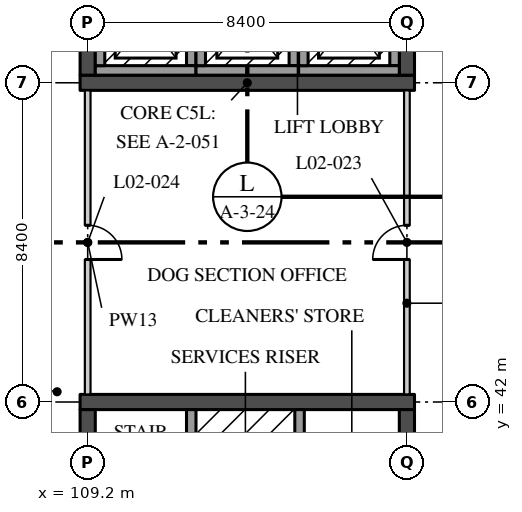
"""IFC4 building model, lengths in metres.
Left out: names, types, materials, properties, quantities, classifications, styles, units other than length and angle.
Written with IfcOpenShell. Run it as: python <this file> out.ifc"""

import sys

from ifc_helpers import new_model, si_unit, direction, frame, frame_2d, origin, place, context, subcontext, project, spatial, rectangle, extrude, element, fill, save


model = new_model("IFC4")
c1 = context("Model", 3, precision=1e-05, world=origin(), true_north=direction((0.0, 1.0)))
c2 = subcontext(c1, "Body", "Model", "MODEL_VIEW")
j1 = project(units=[si_unit("LENGTHUNIT", "METRE"), si_unit("PLANEANGLEUNIT", "RADIAN")], contexts=[c1])
p1 = place(None, origin())
s1 = spatial("IfcSite", under=j1, at=p1, CompositionType="ELEMENT")
p2 = place(p1, origin())
s2 = spatial("IfcBuilding", under=s1, at=p2, CompositionType="ELEMENT")
p3 = place(p2, frame((0.0, 0.0, 9.9)))
s3 = spatial("IfcBuildingStorey", under=s2, at=p3, CompositionType="ELEMENT", Elevation=9.9)
p4 = place(p3, frame((109.0, 50.4, 0.0), z_axis=(0.0, 0.0, 1.0), x_axis=(1.0, 0.0, 0.0)))
e1 = element("IfcWall", 1, at=p4, inside=s3, PredefinedType="SHEAR", context=c2, shape_type="SweptSolid", body=[
    extrude(rectangle(XDim=8.8, YDim=0.4, at=frame_2d((4.4, 0.0))), origin(), (0.0, 0.0, 1.0), 4.37),
])
p5 = place(p3, frame((109.2, 50.6, 0.0), z_axis=(0.0, 0.0, 1.0), x_axis=(0.0, 1.0, 0.0)))
e2 = element("IfcWall", 2, at=p5, inside=s3, PredefinedType="SHEAR", context=c2, shape_type="SweptSolid", body=[
    extrude(rectangle(XDim=8.0, YDim=0.4, at=frame_2d((4.0, 0.0))), origin(), (0.0, 0.0, 1.0), 4.37),
])
p6 = place(p5, frame((3.25, 0.0, 0.0)))
e3 = element("IfcOpeningElement", 3, at=p6, cuts=e2, PredefinedType="OPENING", context=c2, shape_type="SweptSolid", body=[
    extrude(rectangle(XDim=1.2, YDim=2.1, at=frame_2d((0.6, 1.05))), frame((0.0, 0.21, 0.0), z_axis=(0.0, -1.0, 0.0), x_axis=(1.0, 0.0, 0.0)), (0.0, 0.0, 1.0), 0.42),
])
p7 = place(p3, frame((117.6, 50.6, 0.0), z_axis=(0.0, 0.0, 1.0), x_axis=(0.0, 1.0, 0.0)))
e4 = element("IfcWall", 4, at=p7, inside=s3, PredefinedType="SHEAR", context=c2, shape_type="SweptSolid", body=[
    extrude(rectangle(XDim=8.0, YDim=0.4, at=frame_2d((4.0, 0.0))), origin(), (0.0, 0.0, 1.0), 4.37),
])
p8 = place(p7, frame((3.25, 0.0, 0.0)))
e5 = element("IfcOpeningElement", 5, at=p8, cuts=e4, PredefinedType="OPENING", context=c2, shape_type="SweptSolid", body=[
    extrude(rectangle(XDim=1.2, YDim=2.1, at=frame_2d((0.6, 1.05))), frame((0.0, 0.21, 0.0), z_axis=(0.0, -1.0, 0.0), x_axis=(1.0, 0.0, 0.0)), (0.0, 0.0, 1.0), 0.42),
])
p9 = place(p7, frame((6.0, 0.0, 0.0)))
e6 = element("IfcOpeningElement", 6, at=p9, cuts=e4, PredefinedType="OPENING", context=c2, shape_type="SweptSolid", body=[
    extrude(rectangle(XDim=1.2, YDim=2.1, at=frame_2d((0.6, 1.05))), frame((0.0, 0.21, 0.0), z_axis=(0.0, -1.0, 0.0), x_axis=(1.0, 0.0, 0.0)), (0.0, 0.0, 1.0), 0.42),
])
p10 = place(p3, frame((109.0, 42.0, 0.0), z_axis=(0.0, 0.0, 1.0), x_axis=(1.0, 0.0, 0.0)))
e7 = element("IfcWall", 7, at=p10, inside=s3, PredefinedType="SHEAR", context=c2, shape_type="SweptSolid", body=[
    extrude(rectangle(XDim=8.8, YDim=0.4, at=frame_2d((4.4, 0.0))), origin(), (0.0, 0.0, 1.0), 4.37),
])
p11 = place(p3, frame((109.2, 33.8, 0.0), z_axis=(0.0, 0.0, 1.0), x_axis=(0.0, 1.0, 0.0)))
e8 = element("IfcWall", 8, at=p11, inside=s3, PredefinedType="SHEAR", context=c2, shape_type="SweptSolid", body=[
    extrude(rectangle(XDim=8.0, YDim=0.4, at=frame_2d((4.0, 0.0))), origin(), (0.0, 0.0, 1.0), 4.37),
])
p12 = place(p11, frame((3.875, 0.0, 0.0)))
e9 = element("IfcOpeningElement", 9, at=p12, cuts=e8, PredefinedType="OPENING", context=c2, shape_type="SweptSolid", body=[
    extrude(rectangle(XDim=1.2, YDim=2.1, at=frame_2d((0.6, 1.05))), frame((0.0, 0.21, 0.0), z_axis=(0.0, -1.0, 0.0), x_axis=(1.0, 0.0, 0.0)), (0.0, 0.0, 1.0), 0.42),
])
p13 = place(p3, frame((117.6, 33.8, 0.0), z_axis=(0.0, 0.0, 1.0), x_axis=(0.0, 1.0, 0.0)))
e10 = element("IfcWall", 10, at=p13, inside=s3, PredefinedType="SHEAR", context=c2, shape_type="SweptSolid", body=[
    extrude(rectangle(XDim=8.0, YDim=0.4, at=frame_2d((4.0, 0.0))), origin(), (0.0, 0.0, 1.0), 4.37),
])
p14 = place(p13, frame((3.875, 0.0, 0.0)))
e11 = element("IfcOpeningElement", 11, at=p14, cuts=e10, PredefinedType="OPENING", context=c2, shape_type="SweptSolid", body=[
    extrude(rectangle(XDim=1.2, YDim=2.1, at=frame_2d((0.6, 1.05))), frame((0.0, 0.21, 0.0), z_axis=(0.0, -1.0, 0.0), x_axis=(1.0, 0.0, 0.0)), (0.0, 0.0, 1.0), 0.42),
])
p15 = place(p3, frame((111.925, 39.0, 0.0), z_axis=(0.0, 0.0, 1.0), x_axis=(0.0, 1.0, 0.0)))
e12 = element("IfcWall", 12, at=p15, inside=s3, PredefinedType="SOLIDWALL", context=c2, shape_type="SweptSolid", body=[
    extrude(rectangle(XDim=2.8, YDim=0.25, at=frame_2d((1.4, 0.0))), origin(), (0.0, 0.0, 1.0), 4.37),
])
p16 = place(p3, frame((114.775, 39.25, 0.0), z_axis=(0.0, 0.0, 1.0), x_axis=(0.0, 1.0, 0.0)))
e13 = element("IfcWall", 13, at=p16, inside=s3, PredefinedType="SOLIDWALL", context=c2, shape_type="SweptSolid", body=[
    extrude(rectangle(XDim=2.55, YDim=0.25, at=frame_2d((1.275, 0.0))), origin(), (0.0, 0.0, 1.0), 4.37),
])
p17 = place(p3, frame((111.925, 50.85, 0.0), z_axis=(0.0, 0.0, 1.0), x_axis=(0.0, 1.0, 0.0)))
e14 = element("IfcWall", 14, at=p17, inside=s3, PredefinedType="SOLIDWALL", context=c2, shape_type="SweptSolid", body=[
    extrude(rectangle(XDim=2.3, YDim=0.25, at=frame_2d((1.15, 0.0))), origin(), (0.0, 0.0, 1.0), 4.37),
])
p18 = place(p3, frame((109.4, 50.725, 0.0), z_axis=(0.0, 0.0, 1.0), x_axis=(1.0, 0.0, 0.0)))
e15 = element("IfcWall", 15, at=p18, inside=s3, PredefinedType="SOLIDWALL", context=c2, shape_type="SweptSolid", body=[
    extrude(rectangle(XDim=2.65, YDim=0.25, at=frame_2d((1.325, 0.0))), origin(), (0.0, 0.0, 1.0), 4.37),
])
for number, where, z_axis, x_axis in (
    (16, (109.525, 50.85, 0.0), (0.0, 0.0, 1.0), (0.0, 1.0, 0.0)),
    (17, (114.625, 50.85, 0.0), (0.0, 0.0, 1.0), (0.0, 1.0, 0.0)),
):
    element("IfcWall", number, at=place(p3, frame(where, z_axis=z_axis, x_axis=x_axis)), inside=s3, PredefinedType="SOLIDWALL", context=c2, shape_type="SweptSolid", body=[
        extrude(rectangle(XDim=2.3, YDim=0.25, at=frame_2d((1.15, 0.0))), origin(), (0.0, 0.0, 1.0), 4.37),
    ])
p19 = place(p3, frame((112.05, 50.725, 0.0), z_axis=(0.0, 0.0, 1.0), x_axis=(1.0, 0.0, 0.0)))
e18 = element("IfcWall", 18, at=p19, inside=s3, PredefinedType="SOLIDWALL", context=c2, shape_type="SweptSolid", body=[
    extrude(rectangle(XDim=2.7, YDim=0.25, at=frame_2d((1.35, 0.0))), origin(), (0.0, 0.0, 1.0), 4.37),
])
for number, where, z_axis, x_axis in (
    (19, (112.175, 50.85, 0.0), (0.0, 0.0, 1.0), (0.0, 1.0, 0.0)),
    (20, (117.275, 50.85, 0.0), (0.0, 0.0, 1.0), (0.0, 1.0, 0.0)),
):
    element("IfcWall", number, at=place(p3, frame(where, z_axis=z_axis, x_axis=x_axis)), inside=s3, PredefinedType="SOLIDWALL", context=c2, shape_type="SweptSolid", body=[
        extrude(rectangle(XDim=2.3, YDim=0.25, at=frame_2d((1.15, 0.0))), origin(), (0.0, 0.0, 1.0), 4.37),
    ])
p20 = place(p3, frame((114.75, 50.725, 0.0), z_axis=(0.0, 0.0, 1.0), x_axis=(1.0, 0.0, 0.0)))
e21 = element("IfcWall", 21, at=p20, inside=s3, PredefinedType="SOLIDWALL", context=c2, shape_type="SweptSolid", body=[
    extrude(rectangle(XDim=2.65, YDim=0.25, at=frame_2d((1.325, 0.0))), origin(), (0.0, 0.0, 1.0), 4.37),
])
p21 = place(p3, frame((114.875, 50.85, 0.0), z_axis=(0.0, 0.0, 1.0), x_axis=(0.0, 1.0, 0.0)))
e22 = element("IfcWall", 22, at=p21, inside=s3, PredefinedType="SOLIDWALL", context=c2, shape_type="SweptSolid", body=[
    extrude(rectangle(XDim=2.3, YDim=0.25, at=frame_2d((1.15, 0.0))), origin(), (0.0, 0.0, 1.0), 4.37),
])
p22 = place(p3, frame((117.6, 42.2, 0.0), z_axis=(0.0, 0.0, 1.0), x_axis=(0.0, 1.0, 0.0)))
e23 = element("IfcWall", 23, at=p22, inside=s3, PredefinedType="PARTITIONING", context=c2, shape_type="SweptSolid", body=[
    extrude(rectangle(XDim=8.0, YDim=0.15, at=frame_2d((4.0, 0.0))), origin(), (0.0, 0.0, 1.0), 3.746),
])
p23 = place(p22, frame((3.55, 0.0, 0.0)))
e24 = element("IfcOpeningElement", 24, at=p23, cuts=e23, PredefinedType="OPENING", context=c2, shape_type="SweptSolid", body=[
    extrude(rectangle(XDim=0.9, YDim=2.1, at=frame_2d((0.45, 1.05))), frame((0.0, 0.085, 0.0), z_axis=(0.0, -1.0, 0.0), x_axis=(1.0, 0.0, 0.0)), (0.0, 0.0, 1.0), 0.17),
])
p24 = place(p3, frame((109.2, 42.2, 0.0), z_axis=(0.0, 0.0, 1.0), x_axis=(0.0, 1.0, 0.0)))
e25 = element("IfcWall", 25, at=p24, inside=s3, PredefinedType="PARTITIONING", context=c2, shape_type="SweptSolid", body=[
    extrude(rectangle(XDim=8.0, YDim=0.15, at=frame_2d((4.0, 0.0))), origin(), (0.0, 0.0, 1.0), 3.746),
])
p25 = place(p24, frame((3.55, 0.0, 0.0)))
e26 = element("IfcOpeningElement", 26, at=p25, cuts=e25, PredefinedType="OPENING", context=c2, shape_type="SweptSolid", body=[
    extrude(rectangle(XDim=0.9, YDim=2.1, at=frame_2d((0.45, 1.05))), frame((0.0, 0.085, 0.0), z_axis=(0.0, -1.0, 0.0), x_axis=(1.0, 0.0, 0.0)), (0.0, 0.0, 1.0), 0.17),
])
p26 = place(p23, origin())
e27 = element("IfcDoor", 27, at=p26, inside=s3, OperationType="SINGLE_SWING_RIGHT", PredefinedType="DOOR", context=c2, shape_type="SweptSolid", body=[
    extrude(rectangle(XDim=0.9, YDim=2.1, at=frame_2d((0.45, 1.05))), frame((0.0, 0.025, 0.0), z_axis=(0.0, -1.0, 0.0), x_axis=(1.0, 0.0, 0.0)), (0.0, 0.0, 1.0), 0.05),
])
fill(e24, e27)
p27 = place(p25, frame((0.9, 0.0, 0.0), z_axis=(0.0, 0.0, 1.0), x_axis=(-1.0, 0.0, 0.0)))
e28 = element("IfcDoor", 28, at=p27, inside=s3, OperationType="SINGLE_SWING_LEFT", PredefinedType="DOOR", context=c2, shape_type="SweptSolid", body=[
    extrude(rectangle(XDim=0.9, YDim=2.1, at=frame_2d((0.45, 1.05))), frame((0.0, 0.025, 0.0), z_axis=(0.0, -1.0, 0.0), x_axis=(1.0, 0.0, 0.0)), (0.0, 0.0, 1.0), 0.05),
])
fill(e26, e28)
save(model, sys.argv[1])
